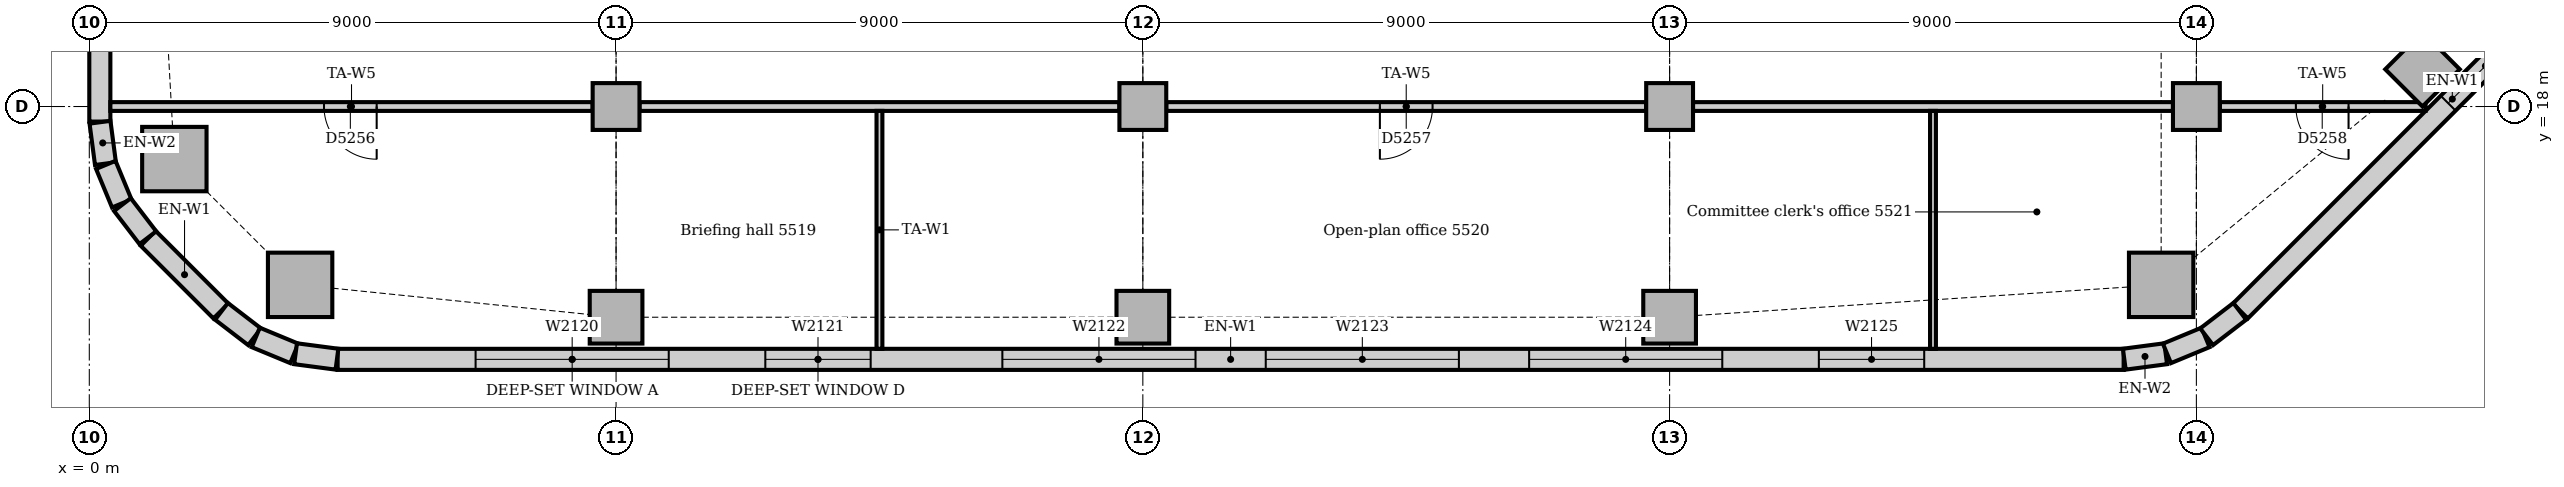
"""IFC4 building model, lengths in metres.
Left out: names, types, materials, properties, quantities, classifications, styles, units other than length and angle.
Written with IfcOpenShell. Run it as: python <this file> out.ifc"""

import sys

from ifc_helpers import new_model, si_unit, direction, frame, frame_2d, origin, origin_2d, place, context, subcontext, project, spatial, rectangle, extrude, element, fill, save


model = new_model("IFC4")
c1 = context("Model", 3, precision=1e-05, world=origin(), true_north=direction((0.0, 1.0)))
c2 = subcontext(c1, "Body", "Model", "MODEL_VIEW")
j1 = project(units=[si_unit("LENGTHUNIT", "METRE"), si_unit("PLANEANGLEUNIT", "RADIAN")], contexts=[c1])
p1 = place(None, origin())
s1 = spatial("IfcSite", under=j1, at=p1, CompositionType="ELEMENT")
p2 = place(p1, origin())
s2 = spatial("IfcBuilding", under=s1, at=p2, CompositionType="ELEMENT")
p3 = place(p2, frame((0.0, 0.0, 230.0)))
s3 = spatial("IfcBuildingStorey", under=s2, at=p3, CompositionType="ELEMENT", Elevation=230.0)
for number, where, z_axis, x_axis in (
    (1, (3.602, 14.953, 0.0), (0.0, 0.0, 1.0), (1.0, 0.0, 0.0)),
    (2, (35.398, 14.953, 0.0), (0.0, 0.0, 1.0), (1.0, 0.0, 0.0)),
    (3, (1.453, 17.102, 0.0), (0.0, 0.0, 1.0), (1.0, 0.0, 0.0)),
):
    element("IfcColumn", number, at=place(p3, frame(where, z_axis=z_axis, x_axis=x_axis)), inside=s3, PredefinedType="COLUMN", context=c2, shape_type="SweptSolid", body=[
        extrude(rectangle(XDim=1.1, YDim=1.1, at=origin_2d()), origin(), (0.0, 0.0, 1.0), 3.85),
    ])
for number, where, z_axis, x_axis in (
    (4, (9.0, 14.4, 0.0), (0.0, 0.0, 1.0), (1.0, 0.0, 0.0)),
    (5, (18.0, 14.4, 0.0), (0.0, 0.0, 1.0), (1.0, 0.0, 0.0)),
    (6, (27.0, 14.4, 0.0), (0.0, 0.0, 1.0), (1.0, 0.0, 0.0)),
    (7, (39.864, 18.636, 0.0), (0.0, 0.0, 1.0), (0.707, 0.707, 0.0)),
):
    element("IfcColumn", number, at=place(p3, frame(where, z_axis=z_axis, x_axis=x_axis)), inside=s3, PredefinedType="COLUMN", context=c2, shape_type="SweptSolid", body=[
        extrude(rectangle(XDim=0.9, YDim=0.9, at=origin_2d()), origin(), (0.0, 0.0, 1.0), 3.85),
    ])
for number, where, z_axis, x_axis in (
    (8, (9.0, 18.0, 0.0), (0.0, 0.0, 1.0), (1.0, 0.0, 0.0)),
    (9, (18.0, 18.0, 0.0), (0.0, 0.0, 1.0), (1.0, 0.0, 0.0)),
    (10, (27.0, 18.0, 0.0), (0.0, 0.0, 1.0), (1.0, 0.0, 0.0)),
    (11, (36.0, 18.0, 0.0), (0.0, 0.0, 1.0), (1.0, 0.0, 0.0)),
):
    element("IfcColumn", number, at=place(p3, frame(where, z_axis=z_axis, x_axis=x_axis)), inside=s3, PredefinedType="COLUMN", context=c2, shape_type="SweptSolid", body=[
        extrude(rectangle(XDim=0.8, YDim=0.8, at=origin_2d()), origin(), (0.0, 0.0, 1.0), 3.85),
    ])
p4 = place(p3, frame((4.243, 13.68, 0.0), z_axis=(0.0, 0.0, 1.0), x_axis=(1.0, 0.0, 0.0)))
e12 = element("IfcWall", 12, at=p4, inside=s3, PredefinedType="STANDARD", context=c2, shape_type="SweptSolid", body=[
    extrude(rectangle(XDim=30.515, YDim=0.36, at=frame_2d((15.257, 0.0))), origin(), (0.0, 0.0, 1.0), 3.85),
])
p5 = place(p4, frame((2.357, 0.0, 0.9)))
e13 = element("IfcOpeningElement", 13, at=p5, cuts=e12, PredefinedType="OPENING", context=c2, shape_type="SweptSolid", body=[
    extrude(rectangle(XDim=3.3, YDim=1.6, at=frame_2d((1.65, 0.8))), frame((0.0, 0.19, 0.0), z_axis=(0.0, -1.0, 0.0), x_axis=(1.0, 0.0, 0.0)), (0.0, 0.0, 1.0), 0.38),
])
p6 = place(p4, frame((7.307, 0.0, 0.9)))
e14 = element("IfcOpeningElement", 14, at=p6, cuts=e12, PredefinedType="OPENING", context=c2, shape_type="SweptSolid", body=[
    extrude(rectangle(XDim=1.8, YDim=1.6, at=frame_2d((0.9, 0.8))), frame((0.0, 0.19, 0.0), z_axis=(0.0, -1.0, 0.0), x_axis=(1.0, 0.0, 0.0)), (0.0, 0.0, 1.0), 0.38),
])
p7 = place(p4, frame((11.357, 0.0, 0.9)))
e15 = element("IfcOpeningElement", 15, at=p7, cuts=e12, PredefinedType="OPENING", context=c2, shape_type="SweptSolid", body=[
    extrude(rectangle(XDim=3.3, YDim=1.6, at=frame_2d((1.65, 0.8))), frame((0.0, 0.19, 0.0), z_axis=(0.0, -1.0, 0.0), x_axis=(1.0, 0.0, 0.0)), (0.0, 0.0, 1.0), 0.38),
])
p8 = place(p4, frame((15.857, 0.0, 0.9)))
e16 = element("IfcOpeningElement", 16, at=p8, cuts=e12, PredefinedType="OPENING", context=c2, shape_type="SweptSolid", body=[
    extrude(rectangle(XDim=3.3, YDim=1.6, at=frame_2d((1.65, 0.8))), frame((0.0, 0.19, 0.0), z_axis=(0.0, -1.0, 0.0), x_axis=(1.0, 0.0, 0.0)), (0.0, 0.0, 1.0), 0.38),
])
p9 = place(p4, frame((20.357, 0.0, 0.9)))
e17 = element("IfcOpeningElement", 17, at=p9, cuts=e12, PredefinedType="OPENING", context=c2, shape_type="SweptSolid", body=[
    extrude(rectangle(XDim=3.3, YDim=1.6, at=frame_2d((1.65, 0.8))), frame((0.0, 0.19, 0.0), z_axis=(0.0, -1.0, 0.0), x_axis=(1.0, 0.0, 0.0)), (0.0, 0.0, 1.0), 0.38),
])
p10 = place(p4, frame((25.307, 0.0, 0.9)))
e18 = element("IfcOpeningElement", 18, at=p10, cuts=e12, PredefinedType="OPENING", context=c2, shape_type="SweptSolid", body=[
    extrude(rectangle(XDim=1.8, YDim=1.6, at=frame_2d((0.9, 0.8))), frame((0.0, 0.19, 0.0), z_axis=(0.0, -1.0, 0.0), x_axis=(1.0, 0.0, 0.0)), (0.0, 0.0, 1.0), 0.38),
])
p11 = place(p3, frame((36.751, 14.506, 0.0), z_axis=(0.0, 0.0, 1.0), x_axis=(0.707106781187, 0.707106781187, 0.0)))
e19 = element("IfcWall", 19, at=p11, inside=s3, PredefinedType="STANDARD", context=c2, shape_type="SweptSolid", body=[
    extrude(rectangle(XDim=10.243, YDim=0.36, at=frame_2d((5.121, 0.0))), origin(), (0.0, 0.0, 1.0), 3.85),
])
p12 = place(p11, frame((5.021, 0.0, 0.9)))
e20 = element("IfcOpeningElement", 20, at=p12, cuts=e19, PredefinedType="OPENING", context=c2, shape_type="SweptSolid", body=[
    extrude(rectangle(XDim=1.8, YDim=1.6, at=frame_2d((0.9, 0.8))), frame((0.0, 0.19, 0.0), z_axis=(0.0, -1.0, 0.0), x_axis=(1.0, 0.0, 0.0)), (0.0, 0.0, 1.0), 0.38),
])
p13 = place(p3, frame((0.18, 21.0, 0.0), z_axis=(0.0, 0.0, 1.0), x_axis=(0.0, -1.0, 0.0)))
e21 = element("IfcWall", 21, at=p13, inside=s3, PredefinedType="STANDARD", context=c2, shape_type="SweptSolid", body=[
    extrude(rectangle(XDim=3.257, YDim=0.36, at=frame_2d((1.629, 0.0))), origin(), (0.0, 0.0, 1.0), 3.85),
])
p14 = place(p3, frame((1.006, 15.749, 0.0), z_axis=(0.0, 0.0, 1.0), x_axis=(0.707106781187, -0.707106781187, 0.0)))
e22 = element("IfcWall", 22, at=p14, inside=s3, PredefinedType="STANDARD", context=c2, shape_type="SweptSolid", body=[
    extrude(rectangle(XDim=1.757, YDim=0.36, at=frame_2d((0.879, 0.0))), origin(), (0.0, 0.0, 1.0), 3.85),
])
for number, where, z_axis, x_axis in (
    (23, (34.769, 13.683, 0.0), (0.0, 0.0, 1.0), (0.991, 0.131, 0.0)),
    (24, (35.497, 13.782, 0.0), (0.0, 0.0, 1.0), (0.924, 0.383, 0.0)),
):
    element("IfcWall", number, at=place(p3, frame(where, z_axis=z_axis, x_axis=x_axis)), inside=s3, PredefinedType="STANDARD", context=c2, shape_type="SweptSolid", body=[
        extrude(rectangle(XDim=0.713, YDim=0.36, at=frame_2d((0.356, 0.0))), origin(), (0.0, 0.0, 1.0), 3.85),
    ])
p15 = place(p3, frame((36.175, 14.066, 0.0), z_axis=(0.0, 0.0, 1.0), x_axis=(0.793321924995, 0.608802368033, 0.0)))
e25 = element("IfcWall", 25, at=p15, inside=s3, PredefinedType="STANDARD", context=c2, shape_type="SweptSolid", body=[
    extrude(rectangle(XDim=0.713, YDim=0.36, at=frame_2d((0.357, 0.0))), origin(), (0.0, 0.0, 1.0), 3.85),
])
for number, where, z_axis, x_axis in (
    (26, (0.183, 17.731, 0.0), (0.0, 0.0, 1.0), (0.131, -0.991, 0.0)),
    (27, (0.282, 17.003, 0.0), (0.0, 0.0, 1.0), (0.383, -0.924, 0.0)),
):
    element("IfcWall", number, at=place(p3, frame(where, z_axis=z_axis, x_axis=x_axis)), inside=s3, PredefinedType="STANDARD", context=c2, shape_type="SweptSolid", body=[
        extrude(rectangle(XDim=0.713, YDim=0.36, at=frame_2d((0.356, 0.0))), origin(), (0.0, 0.0, 1.0), 3.85),
    ])
for number, where, z_axis, x_axis in (
    (28, (0.566, 16.325, 0.0), (0.0, 0.0, 1.0), (0.609, -0.793, 0.0)),
    (29, (2.259, 14.5, 0.0), (0.0, 0.0, 1.0), (0.793, -0.609, 0.0)),
):
    element("IfcWall", number, at=place(p3, frame(where, z_axis=z_axis, x_axis=x_axis)), inside=s3, PredefinedType="STANDARD", context=c2, shape_type="SweptSolid", body=[
        extrude(rectangle(XDim=0.713, YDim=0.36, at=frame_2d((0.357, 0.0))), origin(), (0.0, 0.0, 1.0), 3.85),
    ])
for number, where, z_axis, x_axis in (
    (30, (2.844, 14.055, 0.0), (0.0, 0.0, 1.0), (0.924, -0.383, 0.0)),
    (31, (3.524, 13.776, 0.0), (0.0, 0.0, 1.0), (0.991, -0.131, 0.0)),
):
    element("IfcWall", number, at=place(p3, frame(where, z_axis=z_axis, x_axis=x_axis)), inside=s3, PredefinedType="STANDARD", context=c2, shape_type="SweptSolid", body=[
        extrude(rectangle(XDim=0.713, YDim=0.36, at=frame_2d((0.356, 0.0))), origin(), (0.0, 0.0, 1.0), 3.85),
    ])
p16 = place(p3, frame((36.4, 18.0, 0.0), z_axis=(0.0, 0.0, 1.0), x_axis=(1.0, 0.0, 0.0)))
e32 = element("IfcWall", 32, at=p16, inside=s3, PredefinedType="PARTITIONING", context=c2, shape_type="SweptSolid", body=[
    extrude(rectangle(XDim=3.516, YDim=0.15, at=frame_2d((1.758, 0.0))), origin(), (0.0, 0.0, 1.0), 3.602),
])
p17 = place(p16, frame((1.3, 0.0, 0.0)))
e33 = element("IfcOpeningElement", 33, at=p17, cuts=e32, PredefinedType="OPENING", context=c2, shape_type="SweptSolid", body=[
    extrude(rectangle(XDim=0.9, YDim=2.1, at=frame_2d((0.45, 1.05))), frame((0.0, 0.085, 0.0), z_axis=(0.0, -1.0, 0.0), x_axis=(1.0, 0.0, 0.0)), (0.0, 0.0, 1.0), 0.17),
])
p18 = place(p3, frame((27.4, 18.0, 0.0), z_axis=(0.0, 0.0, 1.0), x_axis=(1.0, 0.0, 0.0)))
e34 = element("IfcWall", 34, at=p18, inside=s3, PredefinedType="PARTITIONING", context=c2, shape_type="SweptSolid", body=[
    extrude(rectangle(XDim=8.2, YDim=0.15, at=frame_2d((4.1, 0.0))), origin(), (0.0, 0.0, 1.0), 3.254),
])
p19 = place(p3, frame((18.4, 18.0, 0.0), z_axis=(0.0, 0.0, 1.0), x_axis=(1.0, 0.0, 0.0)))
e35 = element("IfcWall", 35, at=p19, inside=s3, PredefinedType="PARTITIONING", context=c2, shape_type="SweptSolid", body=[
    extrude(rectangle(XDim=8.2, YDim=0.15, at=frame_2d((4.1, 0.0))), origin(), (0.0, 0.0, 1.0), 3.254),
])
p20 = place(p19, frame((3.65, 0.0, 0.0)))
e36 = element("IfcOpeningElement", 36, at=p20, cuts=e35, PredefinedType="OPENING", context=c2, shape_type="SweptSolid", body=[
    extrude(rectangle(XDim=0.9, YDim=2.1, at=frame_2d((0.45, 1.05))), frame((0.0, 0.085, 0.0), z_axis=(0.0, -1.0, 0.0), x_axis=(1.0, 0.0, 0.0)), (0.0, 0.0, 1.0), 0.17),
])
p21 = place(p3, frame((9.4, 18.0, 0.0), z_axis=(0.0, 0.0, 1.0), x_axis=(1.0, 0.0, 0.0)))
e37 = element("IfcWall", 37, at=p21, inside=s3, PredefinedType="PARTITIONING", context=c2, shape_type="SweptSolid", body=[
    extrude(rectangle(XDim=8.2, YDim=0.15, at=frame_2d((4.1, 0.0))), origin(), (0.0, 0.0, 1.0), 3.254),
])
p22 = place(p3, frame((0.36, 18.0, 0.0), z_axis=(0.0, 0.0, 1.0), x_axis=(1.0, 0.0, 0.0)))
e38 = element("IfcWall", 38, at=p22, inside=s3, PredefinedType="PARTITIONING", context=c2, shape_type="SweptSolid", body=[
    extrude(rectangle(XDim=8.24, YDim=0.15, at=frame_2d((4.12, 0.0))), origin(), (0.0, 0.0, 1.0), 3.254),
])
p23 = place(p22, frame((3.65, 0.0, 0.0)))
e39 = element("IfcOpeningElement", 39, at=p23, cuts=e38, PredefinedType="OPENING", context=c2, shape_type="SweptSolid", body=[
    extrude(rectangle(XDim=0.9, YDim=2.1, at=frame_2d((0.45, 1.05))), frame((0.0, 0.085, 0.0), z_axis=(0.0, -1.0, 0.0), x_axis=(1.0, 0.0, 0.0)), (0.0, 0.0, 1.0), 0.17),
])
for number, where, z_axis, x_axis in (
    (40, (13.5, 13.86, 0.0), (0.0, 0.0, 1.0), (0.0, 1.0, 0.0)),
    (41, (31.5, 13.86, 0.0), (0.0, 0.0, 1.0), (0.0, 1.0, 0.0)),
):
    element("IfcWall", number, at=place(p3, frame(where, z_axis=z_axis, x_axis=x_axis)), inside=s3, PredefinedType="PARTITIONING", context=c2, shape_type="SweptSolid", body=[
        extrude(rectangle(XDim=4.065, YDim=0.1, at=frame_2d((2.033, 0.0))), origin(), (0.0, 0.0, 1.0), 3.85),
    ])
p24 = place(p5, origin())
e42 = element("IfcWindow", 42, at=p24, inside=s3, PartitioningType="SINGLE_PANEL", PredefinedType="WINDOW", context=c2, shape_type="SweptSolid", body=[
    extrude(rectangle(XDim=3.3, YDim=1.6, at=frame_2d((1.65, 0.8))), frame((0.0, 0.13, 0.0), z_axis=(0.0, -1.0, 0.0), x_axis=(1.0, 0.0, 0.0)), (0.0, 0.0, 1.0), 0.06),
])
fill(e13, e42)
p25 = place(p6, origin())
e43 = element("IfcWindow", 43, at=p25, inside=s3, PartitioningType="SINGLE_PANEL", PredefinedType="WINDOW", context=c2, shape_type="SweptSolid", body=[
    extrude(rectangle(XDim=1.8, YDim=1.6, at=frame_2d((0.9, 0.8))), frame((0.0, 0.13, 0.0), z_axis=(0.0, -1.0, 0.0), x_axis=(1.0, 0.0, 0.0)), (0.0, 0.0, 1.0), 0.06),
])
fill(e14, e43)
p26 = place(p7, origin())
e44 = element("IfcWindow", 44, at=p26, inside=s3, PartitioningType="SINGLE_PANEL", PredefinedType="WINDOW", context=c2, shape_type="SweptSolid", body=[
    extrude(rectangle(XDim=3.3, YDim=1.6, at=frame_2d((1.65, 0.8))), frame((0.0, 0.13, 0.0), z_axis=(0.0, -1.0, 0.0), x_axis=(1.0, 0.0, 0.0)), (0.0, 0.0, 1.0), 0.06),
])
fill(e15, e44)
p27 = place(p8, origin())
e45 = element("IfcWindow", 45, at=p27, inside=s3, PartitioningType="SINGLE_PANEL", PredefinedType="WINDOW", context=c2, shape_type="SweptSolid", body=[
    extrude(rectangle(XDim=3.3, YDim=1.6, at=frame_2d((1.65, 0.8))), frame((0.0, 0.13, 0.0), z_axis=(0.0, -1.0, 0.0), x_axis=(1.0, 0.0, 0.0)), (0.0, 0.0, 1.0), 0.06),
])
fill(e16, e45)
p28 = place(p9, origin())
e46 = element("IfcWindow", 46, at=p28, inside=s3, PartitioningType="SINGLE_PANEL", PredefinedType="WINDOW", context=c2, shape_type="SweptSolid", body=[
    extrude(rectangle(XDim=3.3, YDim=1.6, at=frame_2d((1.65, 0.8))), frame((0.0, 0.13, 0.0), z_axis=(0.0, -1.0, 0.0), x_axis=(1.0, 0.0, 0.0)), (0.0, 0.0, 1.0), 0.06),
])
fill(e17, e46)
p29 = place(p10, origin())
e47 = element("IfcWindow", 47, at=p29, inside=s3, PartitioningType="SINGLE_PANEL", PredefinedType="WINDOW", context=c2, shape_type="SweptSolid", body=[
    extrude(rectangle(XDim=1.8, YDim=1.6, at=frame_2d((0.9, 0.8))), frame((0.0, 0.13, 0.0), z_axis=(0.0, -1.0, 0.0), x_axis=(1.0, 0.0, 0.0)), (0.0, 0.0, 1.0), 0.06),
])
fill(e18, e47)
p30 = place(p12, origin())
e48 = element("IfcWindow", 48, at=p30, inside=s3, PartitioningType="SINGLE_PANEL", PredefinedType="WINDOW", context=c2, shape_type="SweptSolid", body=[
    extrude(rectangle(XDim=1.8, YDim=1.6, at=frame_2d((0.9, 0.8))), frame((0.0, 0.13, 0.0), z_axis=(0.0, -1.0, 0.0), x_axis=(1.0, 0.0, 0.0)), (0.0, 0.0, 1.0), 0.06),
])
fill(e20, e48)
p31 = place(p23, frame((0.9, 0.0, 0.0), z_axis=(0.0, 0.0, 1.0), x_axis=(-1.0, 0.0, 0.0)))
e49 = element("IfcDoor", 49, at=p31, inside=s3, OperationType="SINGLE_SWING_LEFT", PredefinedType="DOOR", context=c2, shape_type="SweptSolid", body=[
    extrude(rectangle(XDim=0.9, YDim=2.1, at=frame_2d((0.45, 1.05))), frame((0.0, 0.025, 0.0), z_axis=(0.0, -1.0, 0.0), x_axis=(1.0, 0.0, 0.0)), (0.0, 0.0, 1.0), 0.05),
])
fill(e39, e49)
p32 = place(p20, frame((0.9, 0.0, 0.0), z_axis=(0.0, 0.0, 1.0), x_axis=(-1.0, 0.0, 0.0)))
e50 = element("IfcDoor", 50, at=p32, inside=s3, OperationType="SINGLE_SWING_RIGHT", PredefinedType="DOOR", context=c2, shape_type="SweptSolid", body=[
    extrude(rectangle(XDim=0.9, YDim=2.1, at=frame_2d((0.45, 1.05))), frame((0.0, 0.025, 0.0), z_axis=(0.0, -1.0, 0.0), x_axis=(1.0, 0.0, 0.0)), (0.0, 0.0, 1.0), 0.05),
])
fill(e36, e50)
p33 = place(p17, frame((0.9, 0.0, 0.0), z_axis=(0.0, 0.0, 1.0), x_axis=(-1.0, 0.0, 0.0)))
e51 = element("IfcDoor", 51, at=p33, inside=s3, OperationType="SINGLE_SWING_LEFT", PredefinedType="DOOR", context=c2, shape_type="SweptSolid", body=[
    extrude(rectangle(XDim=0.9, YDim=2.1, at=frame_2d((0.45, 1.05))), frame((0.0, 0.025, 0.0), z_axis=(0.0, -1.0, 0.0), x_axis=(1.0, 0.0, 0.0)), (0.0, 0.0, 1.0), 0.05),
])
fill(e33, e51)
save(model, sys.argv[1])
